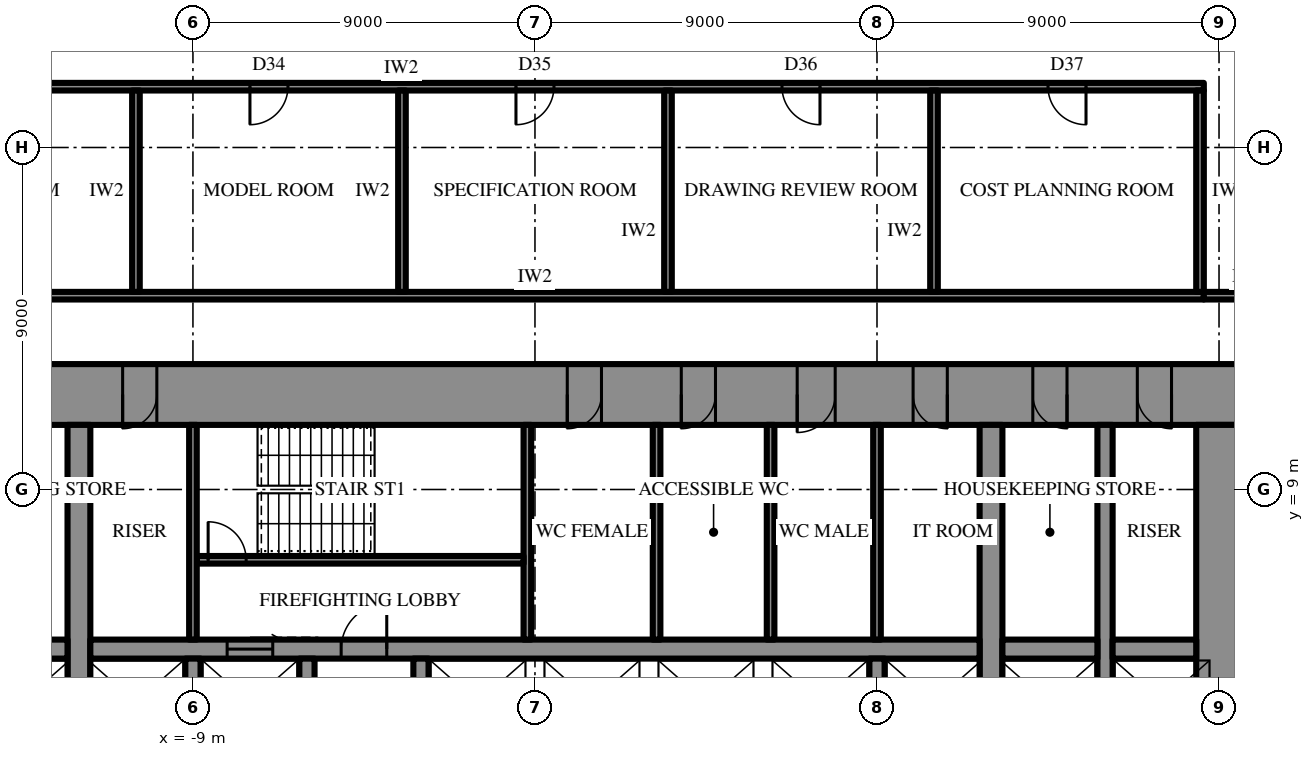
"""IFC4 building model, lengths in metres.
Left out: names, types, materials, properties, quantities, classifications, styles, units other than length and angle.
Written with IfcOpenShell. Run it as: python <this file> out.ifc"""

import sys

from ifc_helpers import new_model, si_unit, direction, frame, frame_2d, origin, place, context, subcontext, project, spatial, rectangle, extrude, element, fill, save


model = new_model("IFC4")
c1 = context("Model", 3, precision=1e-05, world=origin(), true_north=direction((0.0, 1.0)))
c2 = subcontext(c1, "Body", "Model", "MODEL_VIEW")
j1 = project(units=[si_unit("LENGTHUNIT", "METRE"), si_unit("PLANEANGLEUNIT", "RADIAN")], contexts=[c1])
p1 = place(None, origin())
s1 = spatial("IfcSite", under=j1, at=p1, CompositionType="ELEMENT")
p2 = place(p1, origin())
s2 = spatial("IfcBuilding", under=s1, at=p2, CompositionType="ELEMENT")
p3 = place(p2, frame((0.0, 0.0, 52.9)))
s3 = spatial("IfcBuildingStorey", under=s2, at=p3, CompositionType="ELEMENT", Elevation=52.9)
p4 = place(p3, frame((-18.6, 11.5, 0.0), z_axis=(0.0, 0.0, 1.0), x_axis=(1.0, 0.0, 0.0)))
e1 = element("IfcWall", 1, at=p4, inside=s3, PredefinedType="SHEAR", context=c2, shape_type="SweptSolid", body=[
    extrude(rectangle(XDim=37.2, YDim=1.6, at=frame_2d((18.6, 0.0))), origin(), (0.0, 0.0, 1.0), 4.2),
])
p5 = place(p4, frame((19.45, 0.0, 0.0)))
e2 = element("IfcOpeningElement", 2, at=p5, cuts=e1, PredefinedType="OPENING", context=c2, shape_type="SweptSolid", body=[
    extrude(rectangle(XDim=0.9, YDim=2.2, at=frame_2d((0.45, 1.1))), frame((0.0, 0.81, 0.0), z_axis=(0.0, -1.0, 0.0), x_axis=(1.0, 0.0, 0.0)), (0.0, 0.0, 1.0), 1.62),
])
p6 = place(p4, frame((22.45, 0.0, 0.0)))
e3 = element("IfcOpeningElement", 3, at=p6, cuts=e1, PredefinedType="OPENING", context=c2, shape_type="SweptSolid", body=[
    extrude(rectangle(XDim=0.9, YDim=2.2, at=frame_2d((0.45, 1.1))), frame((0.0, 0.81, 0.0), z_axis=(0.0, -1.0, 0.0), x_axis=(1.0, 0.0, 0.0)), (0.0, 0.0, 1.0), 1.62),
])
p7 = place(p4, frame((25.5, 0.0, 0.0)))
e4 = element("IfcOpeningElement", 4, at=p7, cuts=e1, PredefinedType="OPENING", context=c2, shape_type="SweptSolid", body=[
    extrude(rectangle(XDim=1.0, YDim=2.2, at=frame_2d((0.5, 1.1))), frame((0.0, 0.81, 0.0), z_axis=(0.0, -1.0, 0.0), x_axis=(1.0, 0.0, 0.0)), (0.0, 0.0, 1.0), 1.62),
])
p8 = place(p4, frame((1.85, 0.0, 0.0)))
e5 = element("IfcOpeningElement", 5, at=p8, cuts=e1, PredefinedType="OPENING", context=c2, shape_type="SweptSolid", body=[
    extrude(rectangle(XDim=0.9, YDim=2.2, at=frame_2d((0.45, 1.1))), frame((0.0, 0.81, 0.0), z_axis=(0.0, -1.0, 0.0), x_axis=(1.0, 0.0, 0.0)), (0.0, 0.0, 1.0), 1.62),
])
p9 = place(p4, frame((4.6, 0.0, 0.0)))
e6 = element("IfcOpeningElement", 6, at=p9, cuts=e1, PredefinedType="OPENING", context=c2, shape_type="SweptSolid", body=[
    extrude(rectangle(XDim=0.9, YDim=2.2, at=frame_2d((0.45, 1.1))), frame((0.0, 0.81, 0.0), z_axis=(0.0, -1.0, 0.0), x_axis=(1.0, 0.0, 0.0)), (0.0, 0.0, 1.0), 1.62),
])
p10 = place(p4, frame((7.75, 0.0, 0.0)))
e7 = element("IfcOpeningElement", 7, at=p10, cuts=e1, PredefinedType="OPENING", context=c2, shape_type="SweptSolid", body=[
    extrude(rectangle(XDim=0.9, YDim=2.2, at=frame_2d((0.45, 1.1))), frame((0.0, 0.81, 0.0), z_axis=(0.0, -1.0, 0.0), x_axis=(1.0, 0.0, 0.0)), (0.0, 0.0, 1.0), 1.62),
])
p11 = place(p4, frame((28.55, 0.0, 0.0)))
e8 = element("IfcOpeningElement", 8, at=p11, cuts=e1, PredefinedType="OPENING", context=c2, shape_type="SweptSolid", body=[
    extrude(rectangle(XDim=0.9, YDim=2.2, at=frame_2d((0.45, 1.1))), frame((0.0, 0.81, 0.0), z_axis=(0.0, -1.0, 0.0), x_axis=(1.0, 0.0, 0.0)), (0.0, 0.0, 1.0), 1.62),
])
p12 = place(p4, frame((31.7, 0.0, 0.0)))
e9 = element("IfcOpeningElement", 9, at=p12, cuts=e1, PredefinedType="OPENING", context=c2, shape_type="SweptSolid", body=[
    extrude(rectangle(XDim=0.9, YDim=2.2, at=frame_2d((0.45, 1.1))), frame((0.0, 0.81, 0.0), z_axis=(0.0, -1.0, 0.0), x_axis=(1.0, 0.0, 0.0)), (0.0, 0.0, 1.0), 1.62),
])
p13 = place(p4, frame((34.45, 0.0, 0.0)))
e10 = element("IfcOpeningElement", 10, at=p13, cuts=e1, PredefinedType="OPENING", context=c2, shape_type="SweptSolid", body=[
    extrude(rectangle(XDim=0.9, YDim=2.2, at=frame_2d((0.45, 1.1))), frame((0.0, 0.81, 0.0), z_axis=(0.0, -1.0, 0.0), x_axis=(1.0, 0.0, 0.0)), (0.0, 0.0, 1.0), 1.62),
])
p14 = place(p3, frame((18.0, -10.7, 0.0), z_axis=(0.0, 0.0, 1.0), x_axis=(0.0, 1.0, 0.0)))
e11 = element("IfcWall", 11, at=p14, inside=s3, PredefinedType="SHEAR", context=c2, shape_type="SweptSolid", body=[
    extrude(rectangle(XDim=21.4, YDim=1.2, at=frame_2d((10.7, 0.0))), origin(), (0.0, 0.0, 1.0), 4.2),
])
p15 = place(p14, frame((9.8, 0.0, 0.0)))
e12 = element("IfcOpeningElement", 12, at=p15, cuts=e11, PredefinedType="OPENING", context=c2, shape_type="SweptSolid", body=[
    extrude(rectangle(XDim=1.8, YDim=2.4, at=frame_2d((0.9, 1.2))), frame((0.0, 0.61, 0.0), z_axis=(0.0, -1.0, 0.0), x_axis=(1.0, 0.0, 0.0)), (0.0, 0.0, 1.0), 1.22),
])
p16 = place(p3, frame((12.0, -10.7, 0.0), z_axis=(0.0, 0.0, 1.0), x_axis=(0.0, 1.0, 0.0)))
e13 = element("IfcWall", 13, at=p16, inside=s3, PredefinedType="SHEAR", context=c2, shape_type="SweptSolid", body=[
    extrude(rectangle(XDim=21.4, YDim=0.6, at=frame_2d((10.7, 0.0))), origin(), (0.0, 0.0, 1.0), 4.2),
])
p17 = place(p16, frame((9.8, 0.0, 0.0)))
e14 = element("IfcOpeningElement", 14, at=p17, cuts=e13, PredefinedType="OPENING", context=c2, shape_type="SweptSolid", body=[
    extrude(rectangle(XDim=1.8, YDim=2.4, at=frame_2d((0.9, 1.2))), frame((0.0, 0.31, 0.0), z_axis=(0.0, -1.0, 0.0), x_axis=(1.0, 0.0, 0.0)), (0.0, 0.0, 1.0), 0.62),
])
p18 = place(p3, frame((-12.0, -10.7, 0.0), z_axis=(0.0, 0.0, 1.0), x_axis=(0.0, 1.0, 0.0)))
e15 = element("IfcWall", 15, at=p18, inside=s3, PredefinedType="SHEAR", context=c2, shape_type="SweptSolid", body=[
    extrude(rectangle(XDim=21.4, YDim=0.6, at=frame_2d((10.7, 0.0))), origin(), (0.0, 0.0, 1.0), 4.2),
])
p19 = place(p18, frame((9.8, 0.0, 0.0)))
e16 = element("IfcOpeningElement", 16, at=p19, cuts=e15, PredefinedType="OPENING", context=c2, shape_type="SweptSolid", body=[
    extrude(rectangle(XDim=1.8, YDim=2.4, at=frame_2d((0.9, 1.2))), frame((0.0, 0.31, 0.0), z_axis=(0.0, -1.0, 0.0), x_axis=(1.0, 0.0, 0.0)), (0.0, 0.0, 1.0), 0.62),
])
p20 = place(p3, frame((15.0, -10.7, 0.0), z_axis=(0.0, 0.0, 1.0), x_axis=(0.0, 1.0, 0.0)))
e17 = element("IfcWall", 17, at=p20, inside=s3, PredefinedType="SHEAR", context=c2, shape_type="SweptSolid", body=[
    extrude(rectangle(XDim=21.4, YDim=0.4, at=frame_2d((10.7, 0.0))), origin(), (0.0, 0.0, 1.0), 4.2),
])
p21 = place(p20, frame((9.8, 0.0, 0.0)))
e18 = element("IfcOpeningElement", 18, at=p21, cuts=e17, PredefinedType="OPENING", context=c2, shape_type="SweptSolid", body=[
    extrude(rectangle(XDim=1.8, YDim=2.4, at=frame_2d((0.9, 1.2))), frame((0.0, 0.21, 0.0), z_axis=(0.0, -1.0, 0.0), x_axis=(1.0, 0.0, 0.0)), (0.0, 0.0, 1.0), 0.42),
])
p22 = place(p3, frame((-14.8, 4.8, 0.0), z_axis=(0.0, 0.0, 1.0), x_axis=(1.0, 0.0, 0.0)))
e19 = element("IfcWall", 19, at=p22, inside=s3, PredefinedType="SHEAR", context=c2, shape_type="SweptSolid", body=[
    extrude(rectangle(XDim=2.5, YDim=0.5, at=frame_2d((1.25, 0.0))), origin(), (0.0, 0.0, 1.0), 4.2),
])
p23 = place(p3, frame((-11.7, 4.8, 0.0), z_axis=(0.0, 0.0, 1.0), x_axis=(1.0, 0.0, 0.0)))
e20 = element("IfcWall", 20, at=p23, inside=s3, PredefinedType="SHEAR", context=c2, shape_type="SweptSolid", body=[
    extrude(rectangle(XDim=23.4, YDim=0.5, at=frame_2d((11.7, 0.0))), origin(), (0.0, 0.0, 1.0), 4.2),
])
p24 = place(p23, frame((6.6, 0.0, 0.0)))
e21 = element("IfcOpeningElement", 21, at=p24, cuts=e20, PredefinedType="OPENING", context=c2, shape_type="SweptSolid", body=[
    extrude(rectangle(XDim=1.2, YDim=2.2, at=frame_2d((0.6, 1.1))), frame((0.0, 0.26, 0.0), z_axis=(0.0, -1.0, 0.0), x_axis=(1.0, 0.0, 0.0)), (0.0, 0.0, 1.0), 0.52),
])
p25 = place(p23, frame((3.6, 0.0, 0.0)))
e22 = element("IfcOpeningElement", 22, at=p25, cuts=e20, PredefinedType="OPENING", context=c2, shape_type="SweptSolid", body=[
    extrude(rectangle(XDim=1.2, YDim=2.2, at=frame_2d((0.6, 1.1))), frame((0.0, 0.26, 0.0), z_axis=(0.0, -1.0, 0.0), x_axis=(1.0, 0.0, 0.0)), (0.0, 0.0, 1.0), 0.52),
])
p26 = place(p3, frame((12.3, 4.8, 0.0), z_axis=(0.0, 0.0, 1.0), x_axis=(1.0, 0.0, 0.0)))
e23 = element("IfcWall", 23, at=p26, inside=s3, PredefinedType="SHEAR", context=c2, shape_type="SweptSolid", body=[
    extrude(rectangle(XDim=2.5, YDim=0.5, at=frame_2d((1.25, 0.0))), origin(), (0.0, 0.0, 1.0), 4.2),
])
p27 = place(p3, frame((15.2, 4.8, 0.0), z_axis=(0.0, 0.0, 1.0), x_axis=(1.0, 0.0, 0.0)))
e24 = element("IfcWall", 24, at=p27, inside=s3, PredefinedType="SHEAR", context=c2, shape_type="SweptSolid", body=[
    extrude(rectangle(XDim=2.2, YDim=0.5, at=frame_2d((1.1, 0.0))), origin(), (0.0, 0.0, 1.0), 4.2),
])
for number, where, z_axis, x_axis in (
    (25, (-9.0, 2.25, 0.0), (0.0, 0.0, 1.0), (0.0, 1.0, 0.0)),
    (26, (-6.0, 2.25, 0.0), (0.0, 0.0, 1.0), (0.0, 1.0, 0.0)),
    (27, (-3.0, 2.25, 0.0), (0.0, 0.0, 1.0), (0.0, 1.0, 0.0)),
    (28, (9.0, 2.25, 0.0), (0.0, 0.0, 1.0), (0.0, 1.0, 0.0)),
):
    element("IfcWall", number, at=place(p3, frame(where, z_axis=z_axis, x_axis=x_axis)), inside=s3, PredefinedType="SHEAR", context=c2, shape_type="SweptSolid", body=[
        extrude(rectangle(XDim=2.3, YDim=0.4, at=frame_2d((1.15, 0.0))), origin(), (0.0, 0.0, 1.0), 4.2),
    ])
p28 = place(p3, frame((-0.2, 5.05, 0.0), z_axis=(0.0, 0.0, 1.0), x_axis=(0.0, 1.0, 0.0)))
e29 = element("IfcWall", 29, at=p28, inside=s3, PredefinedType="SHEAR", context=c2, shape_type="SweptSolid", body=[
    extrude(rectangle(XDim=5.65, YDim=0.2, at=frame_2d((2.825, 0.0))), origin(), (0.0, 0.0, 1.0), 4.2),
])
p29 = place(p3, frame((-8.9, 7.15, 0.0), z_axis=(0.0, 0.0, 1.0), x_axis=(1.0, 0.0, 0.0)))
e30 = element("IfcWall", 30, at=p29, inside=s3, PredefinedType="SHEAR", context=c2, shape_type="SweptSolid", body=[
    extrude(rectangle(XDim=8.6, YDim=0.2, at=frame_2d((4.3, 0.0))), origin(), (0.0, 0.0, 1.0), 4.2),
])
p30 = place(p29, frame((0.3, 0.0, 0.0)))
e31 = element("IfcOpeningElement", 31, at=p30, cuts=e30, PredefinedType="OPENING", context=c2, shape_type="SweptSolid", body=[
    extrude(rectangle(XDim=1.0, YDim=2.2, at=frame_2d((0.5, 1.1))), frame((0.0, 0.11, 0.0), z_axis=(0.0, -1.0, 0.0), x_axis=(1.0, 0.0, 0.0)), (0.0, 0.0, 1.0), 0.22),
])
for number, where, z_axis, x_axis in (
    (32, (-9.0, 5.05, 0.0), (0.0, 0.0, 1.0), (0.0, 1.0, 0.0)),
    (33, (9.0, 5.05, 0.0), (0.0, 0.0, 1.0), (0.0, 1.0, 0.0)),
    (34, (3.2, 5.05, 0.0), (0.0, 0.0, 1.0), (0.0, 1.0, 0.0)),
    (35, (6.2, 5.05, 0.0), (0.0, 0.0, 1.0), (0.0, 1.0, 0.0)),
):
    element("IfcWall", number, at=place(p3, frame(where, z_axis=z_axis, x_axis=x_axis)), inside=s3, PredefinedType="PARTITIONING", context=c2, shape_type="SweptSolid", body=[
        extrude(rectangle(XDim=5.65, YDim=0.2, at=frame_2d((2.825, 0.0))), origin(), (0.0, 0.0, 1.0), 4.0),
    ])
p31 = place(p3, frame((-17.6, 14.1, 0.0), z_axis=(0.0, 0.0, 1.0), x_axis=(1.0, 0.0, 0.0)))
e36 = element("IfcWall", 36, at=p31, inside=s3, PredefinedType="PARTITIONING", context=c2, shape_type="SweptSolid", body=[
    extrude(rectangle(XDim=35.2, YDim=0.2, at=frame_2d((17.6, 0.0))), origin(), (0.0, 0.0, 1.0), 4.0),
])
p32 = place(p3, frame((-17.6, 19.6, 0.0), z_axis=(0.0, 0.0, 1.0), x_axis=(1.0, 0.0, 0.0)))
e37 = element("IfcWall", 37, at=p32, inside=s3, PredefinedType="PARTITIONING", context=c2, shape_type="SweptSolid", body=[
    extrude(rectangle(XDim=35.2, YDim=0.2, at=frame_2d((17.6, 0.0))), origin(), (0.0, 0.0, 1.0), 4.0),
])
p33 = place(p32, frame((3.1, 0.0, 0.0)))
e38 = element("IfcOpeningElement", 38, at=p33, cuts=e37, PredefinedType="OPENING", context=c2, shape_type="SweptSolid", body=[
    extrude(rectangle(XDim=1.0, YDim=2.2, at=frame_2d((0.5, 1.1))), frame((0.0, 0.11, 0.0), z_axis=(0.0, -1.0, 0.0), x_axis=(1.0, 0.0, 0.0)), (0.0, 0.0, 1.0), 0.22),
])
p34 = place(p32, frame((10.1, 0.0, 0.0)))
e39 = element("IfcOpeningElement", 39, at=p34, cuts=e37, PredefinedType="OPENING", context=c2, shape_type="SweptSolid", body=[
    extrude(rectangle(XDim=1.0, YDim=2.2, at=frame_2d((0.5, 1.1))), frame((0.0, 0.11, 0.0), z_axis=(0.0, -1.0, 0.0), x_axis=(1.0, 0.0, 0.0)), (0.0, 0.0, 1.0), 0.22),
])
p35 = place(p32, frame((17.1, 0.0, 0.0)))
e40 = element("IfcOpeningElement", 40, at=p35, cuts=e37, PredefinedType="OPENING", context=c2, shape_type="SweptSolid", body=[
    extrude(rectangle(XDim=1.0, YDim=2.2, at=frame_2d((0.5, 1.1))), frame((0.0, 0.11, 0.0), z_axis=(0.0, -1.0, 0.0), x_axis=(1.0, 0.0, 0.0)), (0.0, 0.0, 1.0), 0.22),
])
p36 = place(p32, frame((24.1, 0.0, 0.0)))
e41 = element("IfcOpeningElement", 41, at=p36, cuts=e37, PredefinedType="OPENING", context=c2, shape_type="SweptSolid", body=[
    extrude(rectangle(XDim=1.0, YDim=2.2, at=frame_2d((0.5, 1.1))), frame((0.0, 0.11, 0.0), z_axis=(0.0, -1.0, 0.0), x_axis=(1.0, 0.0, 0.0)), (0.0, 0.0, 1.0), 0.22),
])
p37 = place(p32, frame((31.1, 0.0, 0.0)))
e42 = element("IfcOpeningElement", 42, at=p37, cuts=e37, PredefinedType="OPENING", context=c2, shape_type="SweptSolid", body=[
    extrude(rectangle(XDim=1.0, YDim=2.2, at=frame_2d((0.5, 1.1))), frame((0.0, 0.11, 0.0), z_axis=(0.0, -1.0, 0.0), x_axis=(1.0, 0.0, 0.0)), (0.0, 0.0, 1.0), 0.22),
])
for number, where, z_axis, x_axis in (
    (43, (-10.5, 14.2, 0.0), (0.0, 0.0, 1.0), (0.0, 1.0, 0.0)),
    (44, (-3.5, 14.2, 0.0), (0.0, 0.0, 1.0), (0.0, 1.0, 0.0)),
    (45, (3.5, 14.2, 0.0), (0.0, 0.0, 1.0), (0.0, 1.0, 0.0)),
    (46, (10.5, 14.2, 0.0), (0.0, 0.0, 1.0), (0.0, 1.0, 0.0)),
    (47, (17.5, 14.2, 0.0), (0.0, 0.0, 1.0), (0.0, 1.0, 0.0)),
):
    element("IfcWall", number, at=place(p3, frame(where, z_axis=z_axis, x_axis=x_axis)), inside=s3, PredefinedType="PARTITIONING", context=c2, shape_type="SweptSolid", body=[
        extrude(rectangle(XDim=5.3, YDim=0.2, at=frame_2d((2.65, 0.0))), origin(), (0.0, 0.0, 1.0), 4.0),
    ])
p38 = place(p3, frame((17.6, 14.1, 0.0), z_axis=(0.0, 0.0, 1.0), x_axis=(1.0, 0.0, 0.0)))
e48 = element("IfcWall", 48, at=p38, inside=s3, PredefinedType="PARTITIONING", context=c2, shape_type="SweptSolid", body=[
    extrude(rectangle(XDim=2.4, YDim=0.2, at=frame_2d((1.2, 0.0))), origin(), (0.0, 0.0, 1.0), 4.0),
])
p39 = place(p24, origin())
e49 = element("IfcDoor", 49, at=p39, inside=s3, OperationType="SINGLE_SWING_LEFT", PredefinedType="DOOR", context=c2, shape_type="SweptSolid", body=[
    extrude(rectangle(XDim=1.2, YDim=2.2, at=frame_2d((0.6, 1.1))), frame((0.0, 0.025, 0.0), z_axis=(0.0, -1.0, 0.0), x_axis=(1.0, 0.0, 0.0)), (0.0, 0.0, 1.0), 0.05),
])
fill(e21, e49)
p40 = place(p30, origin())
e50 = element("IfcDoor", 50, at=p40, inside=s3, OperationType="SINGLE_SWING_RIGHT", PredefinedType="DOOR", context=c2, shape_type="SweptSolid", body=[
    extrude(rectangle(XDim=1.0, YDim=2.2, at=frame_2d((0.5, 1.1))), frame((0.0, 0.025, 0.0), z_axis=(0.0, -1.0, 0.0), x_axis=(1.0, 0.0, 0.0)), (0.0, 0.0, 1.0), 0.05),
])
fill(e31, e50)
p41 = place(p5, frame((0.9, 0.0, 0.0), z_axis=(0.0, 0.0, 1.0), x_axis=(-1.0, 0.0, 0.0)))
e51 = element("IfcDoor", 51, at=p41, inside=s3, OperationType="SINGLE_SWING_LEFT", PredefinedType="DOOR", context=c2, shape_type="SweptSolid", body=[
    extrude(rectangle(XDim=0.9, YDim=2.2, at=frame_2d((0.45, 1.1))), frame((0.0, 0.025, 0.0), z_axis=(0.0, -1.0, 0.0), x_axis=(1.0, 0.0, 0.0)), (0.0, 0.0, 1.0), 0.05),
])
fill(e2, e51)
p42 = place(p6, frame((0.9, 0.0, 0.0), z_axis=(0.0, 0.0, 1.0), x_axis=(-1.0, 0.0, 0.0)))
e52 = element("IfcDoor", 52, at=p42, inside=s3, OperationType="SINGLE_SWING_LEFT", PredefinedType="DOOR", context=c2, shape_type="SweptSolid", body=[
    extrude(rectangle(XDim=0.9, YDim=2.2, at=frame_2d((0.45, 1.1))), frame((0.0, 0.025, 0.0), z_axis=(0.0, -1.0, 0.0), x_axis=(1.0, 0.0, 0.0)), (0.0, 0.0, 1.0), 0.05),
])
fill(e3, e52)
p43 = place(p7, frame((1.0, 0.0, 0.0), z_axis=(0.0, 0.0, 1.0), x_axis=(-1.0, 0.0, 0.0)))
e53 = element("IfcDoor", 53, at=p43, inside=s3, OperationType="SINGLE_SWING_LEFT", PredefinedType="DOOR", context=c2, shape_type="SweptSolid", body=[
    extrude(rectangle(XDim=1.0, YDim=2.2, at=frame_2d((0.5, 1.1))), frame((0.0, 0.025, 0.0), z_axis=(0.0, -1.0, 0.0), x_axis=(1.0, 0.0, 0.0)), (0.0, 0.0, 1.0), 0.05),
])
fill(e4, e53)
p44 = place(p10, frame((0.9, 0.0, 0.0), z_axis=(0.0, 0.0, 1.0), x_axis=(-1.0, 0.0, 0.0)))
e54 = element("IfcDoor", 54, at=p44, inside=s3, OperationType="SINGLE_SWING_LEFT", PredefinedType="DOOR", context=c2, shape_type="SweptSolid", body=[
    extrude(rectangle(XDim=0.9, YDim=2.2, at=frame_2d((0.45, 1.1))), frame((0.0, 0.025, 0.0), z_axis=(0.0, -1.0, 0.0), x_axis=(1.0, 0.0, 0.0)), (0.0, 0.0, 1.0), 0.05),
])
fill(e7, e54)
p45 = place(p11, frame((0.9, 0.0, 0.0), z_axis=(0.0, 0.0, 1.0), x_axis=(-1.0, 0.0, 0.0)))
e55 = element("IfcDoor", 55, at=p45, inside=s3, OperationType="SINGLE_SWING_RIGHT", PredefinedType="DOOR", context=c2, shape_type="SweptSolid", body=[
    extrude(rectangle(XDim=0.9, YDim=2.2, at=frame_2d((0.45, 1.1))), frame((0.0, 0.025, 0.0), z_axis=(0.0, -1.0, 0.0), x_axis=(1.0, 0.0, 0.0)), (0.0, 0.0, 1.0), 0.05),
])
fill(e8, e55)
p46 = place(p12, frame((0.9, 0.0, 0.0), z_axis=(0.0, 0.0, 1.0), x_axis=(-1.0, 0.0, 0.0)))
e56 = element("IfcDoor", 56, at=p46, inside=s3, OperationType="SINGLE_SWING_RIGHT", PredefinedType="DOOR", context=c2, shape_type="SweptSolid", body=[
    extrude(rectangle(XDim=0.9, YDim=2.2, at=frame_2d((0.45, 1.1))), frame((0.0, 0.025, 0.0), z_axis=(0.0, -1.0, 0.0), x_axis=(1.0, 0.0, 0.0)), (0.0, 0.0, 1.0), 0.05),
])
fill(e9, e56)
p47 = place(p13, frame((0.9, 0.0, 0.0), z_axis=(0.0, 0.0, 1.0), x_axis=(-1.0, 0.0, 0.0)))
e57 = element("IfcDoor", 57, at=p47, inside=s3, OperationType="SINGLE_SWING_RIGHT", PredefinedType="DOOR", context=c2, shape_type="SweptSolid", body=[
    extrude(rectangle(XDim=0.9, YDim=2.2, at=frame_2d((0.45, 1.1))), frame((0.0, 0.025, 0.0), z_axis=(0.0, -1.0, 0.0), x_axis=(1.0, 0.0, 0.0)), (0.0, 0.0, 1.0), 0.05),
])
fill(e10, e57)
p48 = place(p25, origin())
e58 = element("IfcDoor", 58, at=p48, inside=s3, OperationType="SLIDING_TO_LEFT", PredefinedType="DOOR", context=c2, shape_type="SweptSolid", body=[
    extrude(rectangle(XDim=1.2, YDim=2.2, at=frame_2d((0.6, 1.1))), frame((0.0, 0.025, 0.0), z_axis=(0.0, -1.0, 0.0), x_axis=(1.0, 0.0, 0.0)), (0.0, 0.0, 1.0), 0.05),
])
fill(e22, e58)
p49 = place(p34, frame((1.0, 0.0, 0.0), z_axis=(0.0, 0.0, 1.0), x_axis=(-1.0, 0.0, 0.0)))
e59 = element("IfcDoor", 59, at=p49, inside=s3, OperationType="SINGLE_SWING_LEFT", PredefinedType="DOOR", context=c2, shape_type="SweptSolid", body=[
    extrude(rectangle(XDim=1.0, YDim=2.2, at=frame_2d((0.5, 1.1))), frame((0.0, 0.025, 0.0), z_axis=(0.0, -1.0, 0.0), x_axis=(1.0, 0.0, 0.0)), (0.0, 0.0, 1.0), 0.05),
])
fill(e39, e59)
p50 = place(p35, frame((1.0, 0.0, 0.0), z_axis=(0.0, 0.0, 1.0), x_axis=(-1.0, 0.0, 0.0)))
e60 = element("IfcDoor", 60, at=p50, inside=s3, OperationType="SINGLE_SWING_LEFT", PredefinedType="DOOR", context=c2, shape_type="SweptSolid", body=[
    extrude(rectangle(XDim=1.0, YDim=2.2, at=frame_2d((0.5, 1.1))), frame((0.0, 0.025, 0.0), z_axis=(0.0, -1.0, 0.0), x_axis=(1.0, 0.0, 0.0)), (0.0, 0.0, 1.0), 0.05),
])
fill(e40, e60)
p51 = place(p36, frame((1.0, 0.0, 0.0), z_axis=(0.0, 0.0, 1.0), x_axis=(-1.0, 0.0, 0.0)))
e61 = element("IfcDoor", 61, at=p51, inside=s3, OperationType="SINGLE_SWING_RIGHT", PredefinedType="DOOR", context=c2, shape_type="SweptSolid", body=[
    extrude(rectangle(XDim=1.0, YDim=2.2, at=frame_2d((0.5, 1.1))), frame((0.0, 0.025, 0.0), z_axis=(0.0, -1.0, 0.0), x_axis=(1.0, 0.0, 0.0)), (0.0, 0.0, 1.0), 0.05),
])
fill(e41, e61)
p52 = place(p37, frame((1.0, 0.0, 0.0), z_axis=(0.0, 0.0, 1.0), x_axis=(-1.0, 0.0, 0.0)))
e62 = element("IfcDoor", 62, at=p52, inside=s3, OperationType="SINGLE_SWING_RIGHT", PredefinedType="DOOR", context=c2, shape_type="SweptSolid", body=[
    extrude(rectangle(XDim=1.0, YDim=2.2, at=frame_2d((0.5, 1.1))), frame((0.0, 0.025, 0.0), z_axis=(0.0, -1.0, 0.0), x_axis=(1.0, 0.0, 0.0)), (0.0, 0.0, 1.0), 0.05),
])
fill(e42, e62)
save(model, sys.argv[1])
